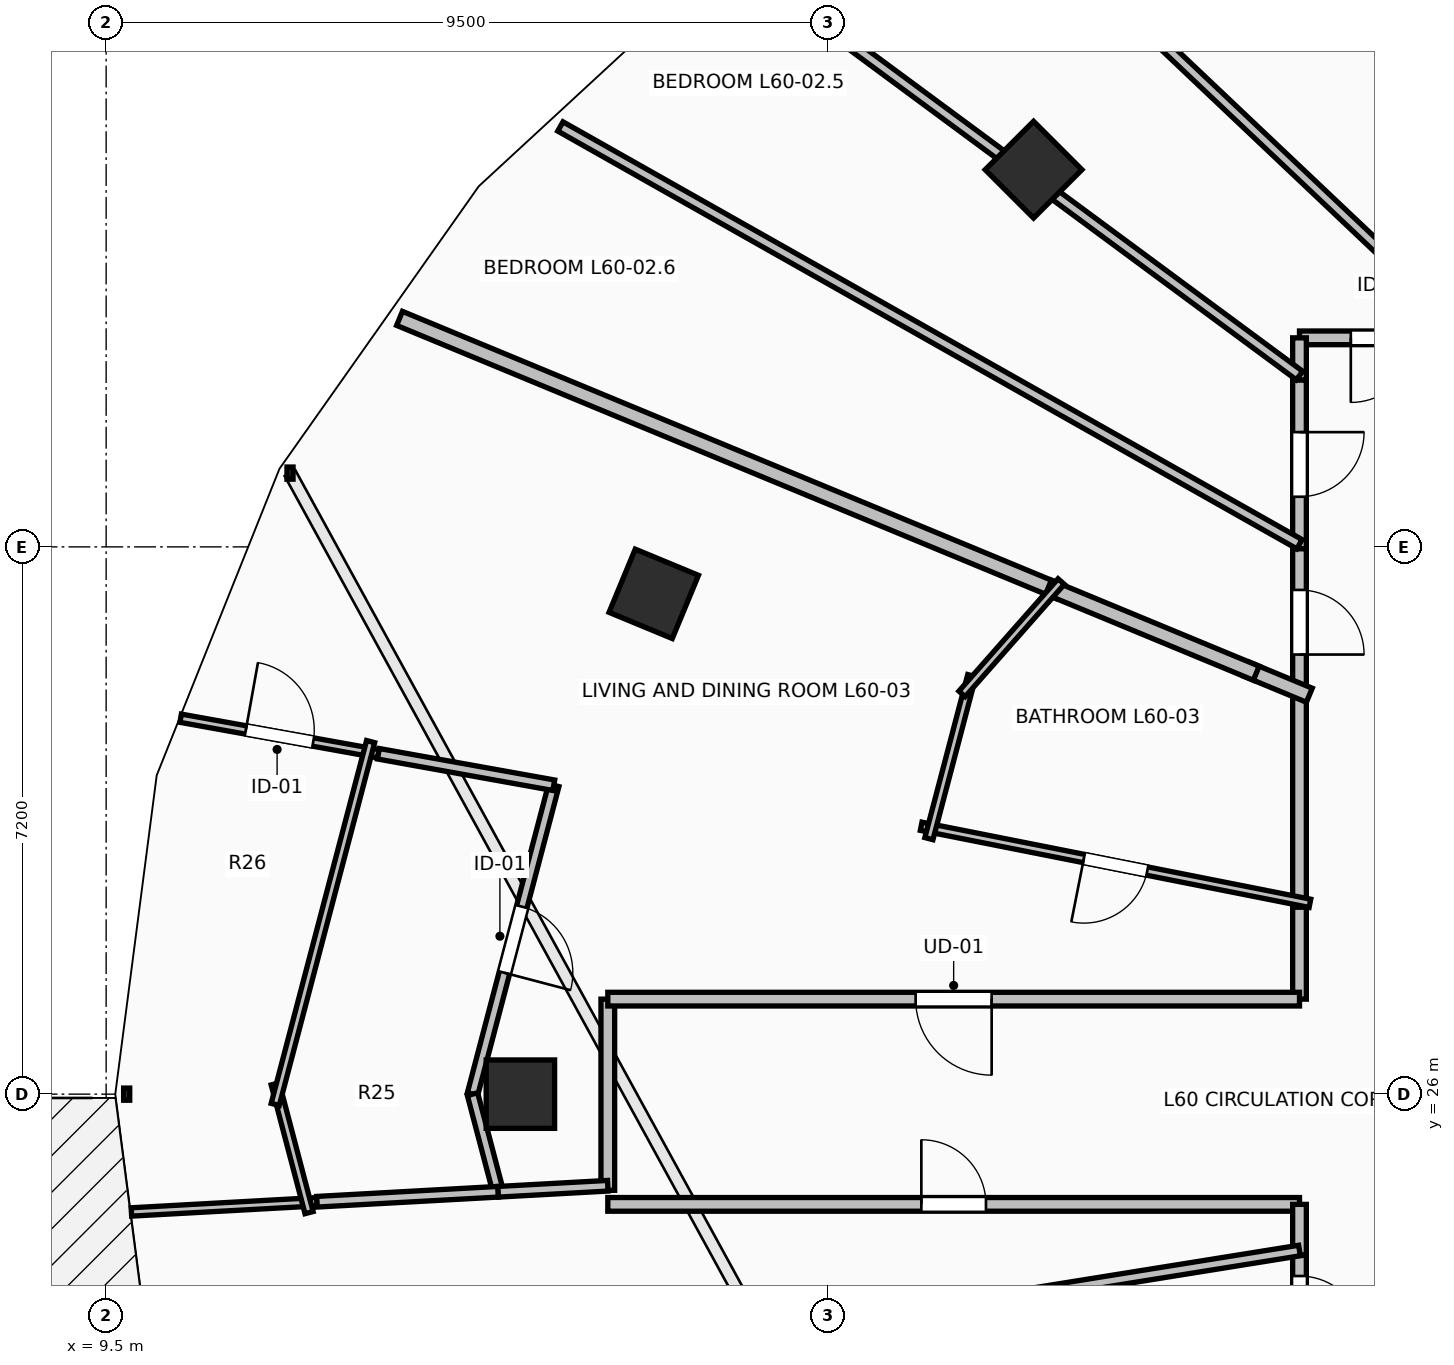
"""IFC4 building model, lengths in metres.
Left out: names, types, materials, properties, quantities, classifications, styles, units other than length and angle.
Written with IfcOpenShell. Run it as: python <this file> out.ifc"""

import sys

from ifc_helpers import new_model, si_unit, direction, frame, frame_2d, origin, origin_2d, place, context, subcontext, project, spatial, rectangle, extrude, element, fill, save


model = new_model("IFC4")
c1 = context("Model", 3, precision=1e-05, world=origin(), true_north=direction((0.0, 1.0)))
c2 = subcontext(c1, "Body", "Model", "MODEL_VIEW")
j1 = project(units=[si_unit("LENGTHUNIT", "METRE"), si_unit("PLANEANGLEUNIT", "RADIAN")], contexts=[c1])
p1 = place(None, origin())
s1 = spatial("IfcSite", under=j1, at=p1, CompositionType="ELEMENT")
p2 = place(p1, origin())
s2 = spatial("IfcBuilding", under=s1, at=p2, CompositionType="ELEMENT")
p3 = place(p2, frame((0.0, 0.0, 221.4)))
s3 = spatial("IfcBuildingStorey", under=s2, at=p3, CompositionType="ELEMENT", Elevation=221.4)
for number, where, z_axis, x_axis in (
    (1, (21.701, 38.162, 0.0), (0.0, 0.0, 1.0), (-0.707, 0.707, 0.0)),
    (2, (16.705, 32.582, 0.0), (0.0, 0.0, 1.0), (-0.924, 0.383, 0.0)),
    (3, (14.95, 26.0, 0.0), (0.0, 0.0, 1.0), (-1.0, 0.0, 0.0)),
):
    element("IfcColumn", number, at=place(p3, frame(where, z_axis=z_axis, x_axis=x_axis)), inside=s3, PredefinedType="COLUMN", context=c2, shape_type="SweptSolid", body=[
        extrude(rectangle(XDim=0.9, YDim=0.9, at=origin_2d()), origin(), (0.0, 0.0, 1.0), 3.55),
    ])
p4 = place(p3, frame((27.4, 35.95, 0.0), z_axis=(0.0, 0.0, 1.0), x_axis=(-1.0, 0.0, 0.0)))
e4 = element("IfcWall", 4, at=p4, inside=s3, PredefinedType="PARTITIONING", context=c2, shape_type="SweptSolid", body=[
    extrude(rectangle(XDim=2.2, YDim=0.18, at=frame_2d((1.1, 0.0))), origin(), (0.0, 0.0, 1.0), 2.834),
])
p5 = place(p4, frame((0.675, 0.0, 0.0)))
e5 = element("IfcOpeningElement", 5, at=p5, cuts=e4, PredefinedType="OPENING", context=c2, shape_type="SweptSolid", body=[
    extrude(rectangle(XDim=0.85, YDim=2.1, at=frame_2d((0.425, 1.05))), frame((0.0, 0.105, 0.0), z_axis=(0.0, -1.0, 0.0), x_axis=(1.0, 0.0, 0.0)), (0.0, 0.0, 1.0), 0.21),
])
p6 = place(p3, frame((25.2, 35.95, 0.0), z_axis=(0.0, 0.0, 1.0), x_axis=(0.0, -1.0, 0.0)))
e6 = element("IfcWall", 6, at=p6, inside=s3, PredefinedType="PARTITIONING", context=c2, shape_type="SweptSolid", body=[
    extrude(rectangle(XDim=0.556, YDim=0.18, at=frame_2d((0.278, 0.0))), origin(), (0.0, 0.0, 1.0), 3.2),
])
p7 = place(p3, frame((25.2, 35.394, 0.0), z_axis=(0.0, 0.0, 1.0), x_axis=(0.0, -1.0, 0.0)))
e7 = element("IfcWall", 7, at=p7, inside=s3, PredefinedType="PARTITIONING", context=c2, shape_type="SweptSolid", body=[
    extrude(rectangle(XDim=2.219, YDim=0.18, at=frame_2d((1.109, 0.0))), origin(), (0.0, 0.0, 1.0), 2.392),
])
p8 = place(p7, frame((0.685, 0.0, 0.0)))
e8 = element("IfcOpeningElement", 8, at=p8, cuts=e7, PredefinedType="OPENING", context=c2, shape_type="SweptSolid", body=[
    extrude(rectangle(XDim=0.85, YDim=2.1, at=frame_2d((0.425, 1.05))), frame((0.0, 0.105, 0.0), z_axis=(0.0, -1.0, 0.0), x_axis=(1.0, 0.0, 0.0)), (0.0, 0.0, 1.0), 0.21),
])
p9 = place(p3, frame((25.2, 33.175, 0.0), z_axis=(0.0, 0.0, 1.0), x_axis=(0.0, -1.0, 0.0)))
e9 = element("IfcWall", 9, at=p9, inside=s3, PredefinedType="PARTITIONING", context=c2, shape_type="SweptSolid", body=[
    extrude(rectangle(XDim=1.933, YDim=0.18, at=frame_2d((0.967, 0.0))), origin(), (0.0, 0.0, 1.0), 3.2),
])
p10 = place(p9, frame((0.542, 0.0, 0.0)))
e10 = element("IfcOpeningElement", 10, at=p10, cuts=e9, PredefinedType="OPENING", context=c2, shape_type="SweptSolid", body=[
    extrude(rectangle(XDim=0.85, YDim=2.1, at=frame_2d((0.425, 1.05))), frame((0.0, 0.105, 0.0), z_axis=(0.0, -1.0, 0.0), x_axis=(1.0, 0.0, 0.0)), (0.0, 0.0, 1.0), 0.21),
])
p11 = place(p3, frame((16.1, 27.25, 0.0), z_axis=(0.0, 0.0, 1.0), x_axis=(0.0, -1.0, 0.0)))
e11 = element("IfcWall", 11, at=p11, inside=s3, PredefinedType="PARTITIONING", context=c2, shape_type="SweptSolid", body=[
    extrude(rectangle(XDim=2.515, YDim=0.18, at=frame_2d((1.257, 0.0))), origin(), (0.0, 0.0, 1.0), 2.392),
])
p12 = place(p3, frame((25.2, 28.599, 0.0), z_axis=(0.0, 0.0, 1.0), x_axis=(0.0, -1.0, 0.0)))
e12 = element("IfcWall", 12, at=p12, inside=s3, PredefinedType="PARTITIONING", context=c2, shape_type="SweptSolid", body=[
    extrude(rectangle(XDim=1.349, YDim=0.18, at=frame_2d((0.675, 0.0))), origin(), (0.0, 0.0, 1.0), 2.392),
])
p13 = place(p3, frame((25.2, 27.25, 0.0), z_axis=(0.0, 0.0, 1.0), x_axis=(-1.0, 0.0, 0.0)))
e13 = element("IfcWall", 13, at=p13, inside=s3, PredefinedType="PARTITIONING", context=c2, shape_type="SweptSolid", body=[
    extrude(rectangle(XDim=9.1, YDim=0.18, at=frame_2d((4.55, 0.0))), origin(), (0.0, 0.0, 1.0), 2.392),
])
p14 = place(p13, frame((4.05, 0.0, 0.0)))
e14 = element("IfcOpeningElement", 14, at=p14, cuts=e13, PredefinedType="OPENING", context=c2, shape_type="SweptSolid", body=[
    extrude(rectangle(XDim=1.0, YDim=2.15, at=frame_2d((0.5, 1.075))), frame((0.0, 0.105, 0.0), z_axis=(0.0, -1.0, 0.0), x_axis=(1.0, 0.0, 0.0)), (0.0, 0.0, 1.0), 0.21),
])
p15 = place(p3, frame((25.2, 31.382, 0.0), z_axis=(0.0, 0.0, 1.0), x_axis=(0.0, -1.0, 0.0)))
e15 = element("IfcWall", 15, at=p15, inside=s3, PredefinedType="PARTITIONING", context=c2, shape_type="SweptSolid", body=[
    extrude(rectangle(XDim=2.923, YDim=0.18, at=frame_2d((1.461, 0.0))), origin(), (0.0, 0.0, 1.0), 2.392),
])
p16 = place(p3, frame((16.1, 24.55, 0.0), z_axis=(0.0, 0.0, 1.0), x_axis=(1.0, 0.0, 0.0)))
e16 = element("IfcWall", 16, at=p16, inside=s3, PredefinedType="PARTITIONING", context=c2, shape_type="SweptSolid", body=[
    extrude(rectangle(XDim=9.1, YDim=0.18, at=frame_2d((4.55, 0.0))), origin(), (0.0, 0.0, 1.0), 2.834),
])
p17 = place(p16, frame((4.125, 0.0, 0.0)))
e17 = element("IfcOpeningElement", 17, at=p17, cuts=e16, PredefinedType="OPENING", context=c2, shape_type="SweptSolid", body=[
    extrude(rectangle(XDim=0.85, YDim=2.1, at=frame_2d((0.425, 1.05))), frame((0.0, 0.105, 0.0), z_axis=(0.0, -1.0, 0.0), x_axis=(1.0, 0.0, 0.0)), (0.0, 0.0, 1.0), 0.21),
])
p18 = place(p3, frame((25.2, 24.55, 0.0), z_axis=(0.0, 0.0, 1.0), x_axis=(0.0, -1.0, 0.0)))
e18 = element("IfcWall", 18, at=p18, inside=s3, PredefinedType="PARTITIONING", context=c2, shape_type="SweptSolid", body=[
    extrude(rectangle(XDim=0.668, YDim=0.18, at=frame_2d((0.334, 0.0))), origin(), (0.0, 0.0, 1.0), 3.2),
])
p19 = place(p3, frame((25.2, 23.882, 0.0), z_axis=(0.0, 0.0, 1.0), x_axis=(0.0, -1.0, 0.0)))
e19 = element("IfcWall", 19, at=p19, inside=s3, PredefinedType="PARTITIONING", context=c2, shape_type="SweptSolid", body=[
    extrude(rectangle(XDim=1.399, YDim=0.18, at=frame_2d((0.7, 0.0))), origin(), (0.0, 0.0, 1.0), 3.2),
])
p20 = place(p19, frame((0.274, 0.0, 0.0)))
e20 = element("IfcOpeningElement", 20, at=p20, cuts=e19, PredefinedType="OPENING", context=c2, shape_type="SweptSolid", body=[
    extrude(rectangle(XDim=0.85, YDim=2.1, at=frame_2d((0.425, 1.05))), frame((0.0, 0.105, 0.0), z_axis=(0.0, -1.0, 0.0), x_axis=(1.0, 0.0, 0.0)), (0.0, 0.0, 1.0), 0.21),
])
p21 = place(p3, frame((25.749, 45.138, 0.0), z_axis=(0.0, 0.0, 1.0), x_axis=(0.539168632786, -0.842197830335, 0.0)))
e21 = element("IfcWall", 21, at=p21, inside=s3, PredefinedType="PARTITIONING", context=c2, shape_type="SweptSolid", body=[
    extrude(rectangle(XDim=10.909, YDim=0.14, at=frame_2d((5.455, 0.0))), origin(), (0.0, 0.0, 1.0), 2.392),
])
p22 = place(p3, frame((23.066, 44.052, 0.0), z_axis=(0.0, 0.0, 1.0), x_axis=(0.637453668746, -0.770488689211, 0.0)))
e22 = element("IfcWall", 22, at=p22, inside=s3, PredefinedType="PARTITIONING", context=c2, shape_type="SweptSolid", body=[
    extrude(rectangle(XDim=10.515, YDim=0.14, at=frame_2d((5.258, 0.0))), origin(), (0.0, 0.0, 1.0), 2.392),
])
p23 = place(p3, frame((20.462, 42.599, 0.0), z_axis=(0.0, 0.0, 1.0), x_axis=(0.726274273347, -0.687405033349, 0.0)))
e23 = element("IfcWall", 23, at=p23, inside=s3, PredefinedType="PARTITIONING", context=c2, shape_type="SweptSolid", body=[
    extrude(rectangle(XDim=9.673, YDim=0.14, at=frame_2d((4.836, 0.0))), origin(), (0.0, 0.0, 1.0), 2.734),
])
p24 = place(p3, frame((17.826, 40.901, 0.0), z_axis=(0.0, 0.0, 1.0), x_axis=(0.804363169868, -0.594137939338, 0.0)))
e24 = element("IfcWall", 24, at=p24, inside=s3, PredefinedType="PARTITIONING", context=c2, shape_type="SweptSolid", body=[
    extrude(rectangle(XDim=9.167, YDim=0.14, at=frame_2d((4.584, 0.0))), origin(), (0.0, 0.0, 1.0), 2.392),
])
p25 = place(p3, frame((15.476, 38.731, 0.0), z_axis=(0.0, 0.0, 1.0), x_axis=(0.870572608778, -0.49203997078, 0.0)))
e25 = element("IfcWall", 25, at=p25, inside=s3, PredefinedType="PARTITIONING", context=c2, shape_type="SweptSolid", body=[
    extrude(rectangle(XDim=11.169, YDim=0.14, at=frame_2d((5.585, 0.0))), origin(), (0.0, 0.0, 1.0), 2.734),
])
p26 = place(p3, frame((13.36, 36.206, 0.0), z_axis=(0.0, 0.0, 1.0), x_axis=(0.923875681471, -0.382692729466, 0.0)))
e26 = element("IfcWall", 26, at=p26, inside=s3, PredefinedType="PARTITIONING", context=c2, shape_type="SweptSolid", body=[
    extrude(rectangle(XDim=9.381, YDim=0.2, at=frame_2d((4.69, 0.0))), origin(), (0.0, 0.0, 1.0), 2.734),
])
p27 = place(p3, frame((24.502, 31.592, 0.0), z_axis=(0.0, 0.0, 1.0), x_axis=(0.923704487622, -0.383105755043, 0.0)))
e27 = element("IfcWall", 27, at=p27, inside=s3, PredefinedType="PARTITIONING", context=c2, shape_type="SweptSolid", body=[
    extrude(rectangle(XDim=0.896, YDim=0.2, at=frame_2d((0.448, 0.0))), origin(), (0.0, 0.0, 1.0), 3.2),
])
p28 = place(p3, frame((21.898, 32.67, 0.0), z_axis=(0.0, 0.0, 1.0), x_axis=(0.923953480513, -0.382504857286, 0.0)))
e28 = element("IfcWall", 28, at=p28, inside=s3, PredefinedType="PARTITIONING", context=c2, shape_type="SweptSolid", body=[
    extrude(rectangle(XDim=2.958, YDim=0.2, at=frame_2d((1.479, 0.0))), origin(), (0.0, 0.0, 1.0), 2.834),
])
p29 = place(p3, frame((25.337, 28.511, 0.0), z_axis=(0.0, 0.0, 1.0), x_axis=(-0.980930272027, 0.194359978959, 0.0)))
e29 = element("IfcWall", 29, at=p29, inside=s3, PredefinedType="PARTITIONING", context=c2, shape_type="SweptSolid", body=[
    extrude(rectangle(XDim=5.214, YDim=0.11, at=frame_2d((2.607, 0.0))), origin(), (0.0, 0.0, 1.0), 2.834),
])
p30 = place(p29, frame((2.182, 0.0, 0.0)))
e30 = element("IfcOpeningElement", 30, at=p30, cuts=e29, PredefinedType="OPENING", context=c2, shape_type="SweptSolid", body=[
    extrude(rectangle(XDim=0.85, YDim=2.1, at=frame_2d((0.425, 1.05))), frame((0.0, 0.07, 0.0), z_axis=(0.0, -1.0, 0.0), x_axis=(1.0, 0.0, 0.0)), (0.0, 0.0, 1.0), 0.14),
])
p31 = place(p3, frame((20.324, 29.362, 0.0), z_axis=(0.0, 0.0, 1.0), x_axis=(0.254406599134, 0.967097348935, 0.0)))
e31 = element("IfcWall", 31, at=p31, inside=s3, PredefinedType="PARTITIONING", context=c2, shape_type="SweptSolid", body=[
    extrude(rectangle(XDim=2.218, YDim=0.11, at=frame_2d((1.109, 0.0))), origin(), (0.0, 0.0, 1.0), 2.392),
])
p32 = place(p3, frame((20.76, 31.266, 0.0), z_axis=(0.0, 0.0, 1.0), x_axis=(0.661699472354, 0.749769170003, 0.0)))
e32 = element("IfcWall", 32, at=p32, inside=s3, PredefinedType="PARTITIONING", context=c2, shape_type="SweptSolid", body=[
    extrude(rectangle(XDim=1.971, YDim=0.11, at=frame_2d((0.985, 0.0))), origin(), (0.0, 0.0, 1.0), 3.2),
])
p33 = place(p3, frame((12.274, 24.585, 0.0), z_axis=(0.0, 0.0, 1.0), x_axis=(-0.998485442787, -0.055016547898, 0.0)))
e33 = element("IfcWall", 33, at=p33, inside=s3, PredefinedType="PARTITIONING", context=c2, shape_type="SweptSolid", body=[
    extrude(rectangle(XDim=2.445, YDim=0.11, at=frame_2d((1.223, 0.0))), origin(), (0.0, 0.0, 1.0), 3.2),
])
p34 = place(p3, frame((10.48, 30.946, 0.0), z_axis=(0.0, 0.0, 1.0), x_axis=(0.98423288508, -0.176877437587, 0.0)))
e34 = element("IfcWall", 34, at=p34, inside=s3, PredefinedType="PARTITIONING", context=c2, shape_type="SweptSolid", body=[
    extrude(rectangle(XDim=2.643, YDim=0.11, at=frame_2d((1.322, 0.0))), origin(), (0.0, 0.0, 1.0), 3.2),
])
p35 = place(p34, frame((0.872, 0.0, 0.0)))
e35 = element("IfcOpeningElement", 35, at=p35, cuts=e34, PredefinedType="OPENING", context=c2, shape_type="SweptSolid", body=[
    extrude(rectangle(XDim=0.9, YDim=2.1, at=frame_2d((0.45, 1.05))), frame((0.0, 0.07, 0.0), z_axis=(0.0, -1.0, 0.0), x_axis=(1.0, 0.0, 0.0)), (0.0, 0.0, 1.0), 0.14),
])
p36 = place(p3, frame((15.389, 30.064, 0.0), z_axis=(0.0, 0.0, 1.0), x_axis=(-0.254356027292, -0.967110651053, 0.0)))
e36 = element("IfcWall", 36, at=p36, inside=s3, PredefinedType="PARTITIONING", context=c2, shape_type="SweptSolid", body=[
    extrude(rectangle(XDim=4.202, YDim=0.14, at=frame_2d((2.101, 0.0))), origin(), (0.0, 0.0, 1.0), 3.2),
])
p37 = place(p36, frame((1.651, 0.0, 0.0)))
e37 = element("IfcOpeningElement", 37, at=p37, cuts=e36, PredefinedType="OPENING", context=c2, shape_type="SweptSolid", body=[
    extrude(rectangle(XDim=0.9, YDim=2.1, at=frame_2d((0.45, 1.05))), frame((0.0, 0.085, 0.0), z_axis=(0.0, -1.0, 0.0), x_axis=(1.0, 0.0, 0.0)), (0.0, 0.0, 1.0), 0.17),
])
p38 = place(p3, frame((14.32, 26.0, 0.0), z_axis=(0.0, 0.0, 1.0), x_axis=(0.254502350799, -0.967072155239, 0.0)))
e38 = element("IfcWall", 38, at=p38, inside=s3, PredefinedType="PARTITIONING", context=c2, shape_type="SweptSolid", body=[
    extrude(rectangle(XDim=1.328, YDim=0.14, at=frame_2d((0.664, 0.0))), origin(), (0.0, 0.0, 1.0), 3.2),
])
p39 = place(p3, frame((14.658, 24.716, 0.0), z_axis=(0.0, 0.0, 1.0), x_axis=(-0.998486041439, -0.055005681988, 0.0)))
e39 = element("IfcWall", 39, at=p39, inside=s3, PredefinedType="PARTITIONING", context=c2, shape_type="SweptSolid", body=[
    extrude(rectangle(XDim=2.388, YDim=0.14, at=frame_2d((1.194, 0.0))), origin(), (0.0, 0.0, 1.0), 3.2),
])
p40 = place(p3, frame((13.082, 30.478, 0.0), z_axis=(0.0, 0.0, 1.0), x_axis=(0.984255878712, -0.176749441923, 0.0)))
e40 = element("IfcWall", 40, at=p40, inside=s3, PredefinedType="PARTITIONING", context=c2, shape_type="SweptSolid", body=[
    extrude(rectangle(XDim=2.344, YDim=0.14, at=frame_2d((1.172, 0.0))), origin(), (0.0, 0.0, 1.0), 3.2),
])
p41 = place(p3, frame((14.658, 24.716, 0.0), z_axis=(0.0, 0.0, 1.0), x_axis=(0.99849911476, 0.054767853933, 0.0)))
e41 = element("IfcWall", 41, at=p41, inside=s3, PredefinedType="PARTITIONING", context=c2, shape_type="SweptSolid", body=[
    extrude(rectangle(XDim=1.444, YDim=0.14, at=frame_2d((0.722, 0.0))), origin(), (0.0, 0.0, 1.0), 2.734),
])
p42 = place(p3, frame((12.17, 24.442, 0.0), z_axis=(0.0, 0.0, 1.0), x_axis=(-0.254260000639, 0.967135901554, 0.0)))
e42 = element("IfcWall", 42, at=p42, inside=s3, PredefinedType="PARTITIONING", context=c2, shape_type="SweptSolid", body=[
    extrude(rectangle(XDim=1.751, YDim=0.11, at=frame_2d((0.876, 0.0))), origin(), (0.0, 0.0, 1.0), 3.2),
])
p43 = place(p3, frame((11.724, 25.865, 0.0), z_axis=(0.0, 0.0, 1.0), x_axis=(0.254271749518, 0.967132812698, 0.0)))
e43 = element("IfcWall", 43, at=p43, inside=s3, PredefinedType="PARTITIONING", context=c2, shape_type="SweptSolid", body=[
    extrude(rectangle(XDim=4.936, YDim=0.11, at=frame_2d((2.468, 0.0))), origin(), (0.0, 0.0, 1.0), 3.2),
])
p44 = place(p3, frame((10.422, 21.569, 0.0), z_axis=(0.0, 0.0, 1.0), x_axis=(0.987340682458, 0.158613923612, 0.0)))
e44 = element("IfcWall", 44, at=p44, inside=s3, PredefinedType="PARTITIONING", context=c2, shape_type="SweptSolid", body=[
    extrude(rectangle(XDim=14.967, YDim=0.14, at=frame_2d((7.484, 0.0))), origin(), (0.0, 0.0, 1.0), 2.734),
])
p45 = place(p14, origin())
e45 = element("IfcDoor", 45, at=p45, inside=s3, OperationType="SINGLE_SWING_LEFT", PredefinedType="DOOR", context=c2, shape_type="SweptSolid", body=[
    extrude(rectangle(XDim=1.0, YDim=2.15, at=frame_2d((0.5, 1.075))), frame((0.0, 0.025, 0.0), z_axis=(0.0, -1.0, 0.0), x_axis=(1.0, 0.0, 0.0)), (0.0, 0.0, 1.0), 0.05),
])
fill(e14, e45)
p46 = place(p30, origin())
e46 = element("IfcDoor", 46, at=p46, inside=s3, OperationType="SINGLE_SWING_RIGHT", PredefinedType="DOOR", context=c2, shape_type="SweptSolid", body=[
    extrude(rectangle(XDim=0.85, YDim=2.1, at=frame_2d((0.425, 1.05))), frame((0.0, 0.025, 0.0), z_axis=(0.0, -1.0, 0.0), x_axis=(1.0, 0.0, 0.0)), (0.0, 0.0, 1.0), 0.05),
])
fill(e30, e46)
p47 = place(p35, origin())
e47 = element("IfcDoor", 47, at=p47, inside=s3, OperationType="SINGLE_SWING_LEFT", PredefinedType="DOOR", context=c2, shape_type="SweptSolid", body=[
    extrude(rectangle(XDim=0.9, YDim=2.1, at=frame_2d((0.45, 1.05))), frame((0.0, 0.025, 0.0), z_axis=(0.0, -1.0, 0.0), x_axis=(1.0, 0.0, 0.0)), (0.0, 0.0, 1.0), 0.05),
])
fill(e35, e47)
p48 = place(p37, origin())
e48 = element("IfcDoor", 48, at=p48, inside=s3, OperationType="SINGLE_SWING_RIGHT", PredefinedType="DOOR", context=c2, shape_type="SweptSolid", body=[
    extrude(rectangle(XDim=0.9, YDim=2.1, at=frame_2d((0.45, 1.05))), frame((0.0, 0.025, 0.0), z_axis=(0.0, -1.0, 0.0), x_axis=(1.0, 0.0, 0.0)), (0.0, 0.0, 1.0), 0.05),
])
fill(e37, e48)
p49 = place(p5, origin())
e49 = element("IfcDoor", 49, at=p49, inside=s3, OperationType="SINGLE_SWING_RIGHT", PredefinedType="DOOR", context=c2, shape_type="SweptSolid", body=[
    extrude(rectangle(XDim=0.85, YDim=2.1, at=frame_2d((0.425, 1.05))), frame((0.0, 0.025, 0.0), z_axis=(0.0, -1.0, 0.0), x_axis=(1.0, 0.0, 0.0)), (0.0, 0.0, 1.0), 0.05),
])
fill(e5, e49)
p50 = place(p8, origin())
e50 = element("IfcDoor", 50, at=p50, inside=s3, OperationType="SINGLE_SWING_LEFT", PredefinedType="DOOR", context=c2, shape_type="SweptSolid", body=[
    extrude(rectangle(XDim=0.85, YDim=2.1, at=frame_2d((0.425, 1.05))), frame((0.0, 0.025, 0.0), z_axis=(0.0, -1.0, 0.0), x_axis=(1.0, 0.0, 0.0)), (0.0, 0.0, 1.0), 0.05),
])
fill(e8, e50)
p51 = place(p10, origin())
e51 = element("IfcDoor", 51, at=p51, inside=s3, OperationType="SINGLE_SWING_RIGHT", PredefinedType="DOOR", context=c2, shape_type="SweptSolid", body=[
    extrude(rectangle(XDim=0.85, YDim=2.1, at=frame_2d((0.425, 1.05))), frame((0.0, 0.025, 0.0), z_axis=(0.0, -1.0, 0.0), x_axis=(1.0, 0.0, 0.0)), (0.0, 0.0, 1.0), 0.05),
])
fill(e10, e51)
p52 = place(p17, origin())
e52 = element("IfcDoor", 52, at=p52, inside=s3, OperationType="SINGLE_SWING_LEFT", PredefinedType="DOOR", context=c2, shape_type="SweptSolid", body=[
    extrude(rectangle(XDim=0.85, YDim=2.1, at=frame_2d((0.425, 1.05))), frame((0.0, 0.025, 0.0), z_axis=(0.0, -1.0, 0.0), x_axis=(1.0, 0.0, 0.0)), (0.0, 0.0, 1.0), 0.05),
])
fill(e17, e52)
p53 = place(p20, origin())
e53 = element("IfcDoor", 53, at=p53, inside=s3, OperationType="SINGLE_SWING_RIGHT", PredefinedType="DOOR", context=c2, shape_type="SweptSolid", body=[
    extrude(rectangle(XDim=0.85, YDim=2.1, at=frame_2d((0.425, 1.05))), frame((0.0, 0.025, 0.0), z_axis=(0.0, -1.0, 0.0), x_axis=(1.0, 0.0, 0.0)), (0.0, 0.0, 1.0), 0.05),
])
fill(e20, e53)
save(model, sys.argv[1])
